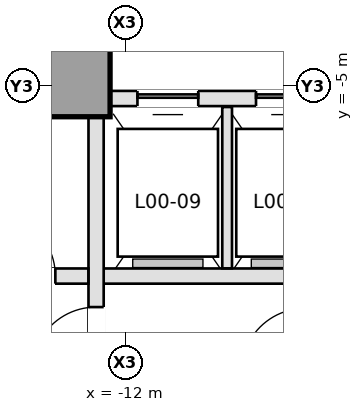
"""IFC4 building model, lengths in metres.
Left out: names, types, materials, properties, quantities, classifications, styles, units other than length and angle.
Written with IfcOpenShell. Run it as: python <this file> out.ifc"""

import sys

from ifc_helpers import new_model, si_unit, direction, frame, frame_2d, origin, origin_2d, place, context, subcontext, project, spatial, rectangle, extrude, element, fill, save


model = new_model("IFC4")
c1 = context("Model", 3, precision=1e-05, world=origin(), true_north=direction((0.0, 1.0)))
c2 = subcontext(c1, "Body", "Model", "MODEL_VIEW")
j1 = project(units=[si_unit("LENGTHUNIT", "METRE"), si_unit("PLANEANGLEUNIT", "RADIAN")], contexts=[c1])
p1 = place(None, origin())
s1 = spatial("IfcSite", under=j1, at=p1, CompositionType="ELEMENT")
p2 = place(p1, origin())
s2 = spatial("IfcBuilding", under=s1, at=p2, CompositionType="ELEMENT")
p3 = place(p2, origin())
s3 = spatial("IfcBuildingStorey", under=s2, at=p3, CompositionType="ELEMENT", Elevation=0.0)
p4 = place(p3, frame((-12.95, -4.8, 0.0), z_axis=(0.0, 0.0, 1.0), x_axis=(1.0, 0.0, 0.0)))
e1 = element("IfcColumn", 1, at=p4, inside=s3, PredefinedType="COLUMN", context=c2, shape_type="SweptSolid", body=[
    extrude(rectangle(XDim=1.4, YDim=1.4, at=origin_2d()), origin(), (0.0, 0.0, 1.0), 5.0),
])
p5 = place(p3, frame((-12.38, -8.12, 0.0), z_axis=(0.0, 0.0, 1.0), x_axis=(1.0, 0.0, 0.0)))
e2 = element("IfcWall", 2, at=p5, inside=s3, PredefinedType="PARTITIONING", context=c2, shape_type="SweptSolid", body=[
    extrude(rectangle(XDim=3.22, YDim=0.25, at=frame_2d((1.61, 0.0))), origin(), (0.0, 0.0, 1.0), 4.7),
])
p6 = place(p3, frame((-12.48, -10.18, 0.0), z_axis=(0.0, 0.0, 1.0), x_axis=(0.0, 1.0, 0.0)))
e3 = element("IfcWall", 3, at=p6, inside=s3, PredefinedType="PARTITIONING", context=c2, shape_type="SweptSolid", body=[
    extrude(rectangle(XDim=4.678, YDim=0.25, at=frame_2d((2.339, 0.0))), origin(), (0.0, 0.0, 1.0), 4.7),
])
p7 = place(p6, frame((0.5, 0.0, 0.0)))
e4 = element("IfcOpeningElement", 4, at=p7, cuts=e3, PredefinedType="OPENING", context=c2, shape_type="SweptSolid", body=[
    extrude(rectangle(XDim=1.05, YDim=2.15, at=frame_2d((0.525, 1.075))), frame((0.0, 0.135, 0.0), z_axis=(0.0, -1.0, 0.0), x_axis=(1.0, 0.0, 0.0)), (0.0, 0.0, 1.0), 0.27),
])
p8 = place(p3, frame((-12.248, -5.2, 0.0), z_axis=(0.0, 0.0, 1.0), x_axis=(1.0, 0.0, 0.0)))
e5 = element("IfcWall", 5, at=p8, inside=s3, PredefinedType="PARTITIONING", context=c2, shape_type="SweptSolid", body=[
    extrude(rectangle(XDim=7.796, YDim=0.25, at=frame_2d((3.898, 0.0))), origin(), (0.0, 0.0, 1.0), 4.7),
])
p9 = place(p8, frame((0.448, 0.0, 0.0)))
e6 = element("IfcOpeningElement", 6, at=p9, cuts=e5, PredefinedType="OPENING", context=c2, shape_type="SweptSolid", body=[
    extrude(rectangle(XDim=1.0, YDim=2.15, at=frame_2d((0.5, 1.075))), frame((0.0, 0.135, 0.0), z_axis=(0.0, -1.0, 0.0), x_axis=(1.0, 0.0, 0.0)), (0.0, 0.0, 1.0), 0.27),
])
p10 = place(p8, frame((2.398, 0.0, 0.0)))
e7 = element("IfcOpeningElement", 7, at=p10, cuts=e5, PredefinedType="OPENING", context=c2, shape_type="SweptSolid", body=[
    extrude(rectangle(XDim=1.0, YDim=2.15, at=frame_2d((0.5, 1.075))), frame((0.0, 0.135, 0.0), z_axis=(0.0, -1.0, 0.0), x_axis=(1.0, 0.0, 0.0)), (0.0, 0.0, 1.0), 0.27),
])
p11 = place(p8, frame((4.348, 0.0, 0.0)))
e8 = element("IfcOpeningElement", 8, at=p11, cuts=e5, PredefinedType="OPENING", context=c2, shape_type="SweptSolid", body=[
    extrude(rectangle(XDim=1.0, YDim=2.15, at=frame_2d((0.5, 1.075))), frame((0.0, 0.135, 0.0), z_axis=(0.0, -1.0, 0.0), x_axis=(1.0, 0.0, 0.0)), (0.0, 0.0, 1.0), 0.27),
])
p12 = place(p8, frame((6.298, 0.0, 0.0)))
e9 = element("IfcOpeningElement", 9, at=p12, cuts=e5, PredefinedType="OPENING", context=c2, shape_type="SweptSolid", body=[
    extrude(rectangle(XDim=1.0, YDim=2.15, at=frame_2d((0.5, 1.075))), frame((0.0, 0.135, 0.0), z_axis=(0.0, -1.0, 0.0), x_axis=(1.0, 0.0, 0.0)), (0.0, 0.0, 1.0), 0.27),
])
p13 = place(p3, frame((-10.325, -7.993, 0.0), z_axis=(0.0, 0.0, 1.0), x_axis=(0.0, 1.0, 0.0)))
e10 = element("IfcWall", 10, at=p13, inside=s3, PredefinedType="PARTITIONING", context=c2, shape_type="SweptSolid", body=[
    extrude(rectangle(XDim=2.653, YDim=0.16, at=frame_2d((1.326, 0.0))), origin(), (0.0, 0.0, 1.0), 4.7),
])
p14 = place(p3, frame((-14.72, -8.12, 0.0), z_axis=(0.0, 0.0, 1.0), x_axis=(1.0, 0.0, 0.0)))
e11 = element("IfcWall", 11, at=p14, inside=s3, PredefinedType="PARTITIONING", context=c2, shape_type="SweptSolid", body=[
    extrude(rectangle(XDim=2.113, YDim=0.25, at=frame_2d((1.057, 0.0))), origin(), (0.0, 0.0, 1.0), 4.7),
])
p15 = place(p14, frame((0.52, 0.0, 0.0)))
e12 = element("IfcOpeningElement", 12, at=p15, cuts=e11, PredefinedType="OPENING", context=c2, shape_type="SweptSolid", body=[
    extrude(rectangle(XDim=1.05, YDim=2.15, at=frame_2d((0.525, 1.075))), frame((0.0, 0.135, 0.0), z_axis=(0.0, -1.0, 0.0), x_axis=(1.0, 0.0, 0.0)), (0.0, 0.0, 1.0), 0.27),
])
p16 = place(p9, origin())
e13 = element("IfcDoor", 13, at=p16, inside=s3, OperationType="SLIDING_TO_LEFT", PredefinedType="DOOR", context=c2, shape_type="SweptSolid", body=[
    extrude(rectangle(XDim=1.0, YDim=2.15, at=frame_2d((0.5, 1.075))), frame((0.0, 0.025, 0.0), z_axis=(0.0, -1.0, 0.0), x_axis=(1.0, 0.0, 0.0)), (0.0, 0.0, 1.0), 0.05),
])
fill(e6, e13)
p17 = place(p10, origin())
e14 = element("IfcDoor", 14, at=p17, inside=s3, OperationType="SLIDING_TO_LEFT", PredefinedType="DOOR", context=c2, shape_type="SweptSolid", body=[
    extrude(rectangle(XDim=1.0, YDim=2.15, at=frame_2d((0.5, 1.075))), frame((0.0, 0.025, 0.0), z_axis=(0.0, -1.0, 0.0), x_axis=(1.0, 0.0, 0.0)), (0.0, 0.0, 1.0), 0.05),
])
fill(e7, e14)
p18 = place(p15, origin())
e15 = element("IfcDoor", 15, at=p18, inside=s3, OperationType="SINGLE_SWING_LEFT", PredefinedType="DOOR", context=c2, shape_type="SweptSolid", body=[
    extrude(rectangle(XDim=1.05, YDim=2.15, at=frame_2d((0.525, 1.075))), frame((0.0, 0.025, 0.0), z_axis=(0.0, -1.0, 0.0), x_axis=(1.0, 0.0, 0.0)), (0.0, 0.0, 1.0), 0.05),
])
fill(e12, e15)
p19 = place(p7, origin())
e16 = element("IfcDoor", 16, at=p19, inside=s3, OperationType="SINGLE_SWING_LEFT", PredefinedType="DOOR", context=c2, shape_type="SweptSolid", body=[
    extrude(rectangle(XDim=1.05, YDim=2.15, at=frame_2d((0.525, 1.075))), frame((0.0, 0.025, 0.0), z_axis=(0.0, -1.0, 0.0), x_axis=(1.0, 0.0, 0.0)), (0.0, 0.0, 1.0), 0.05),
])
fill(e4, e16)
save(model, sys.argv[1])
